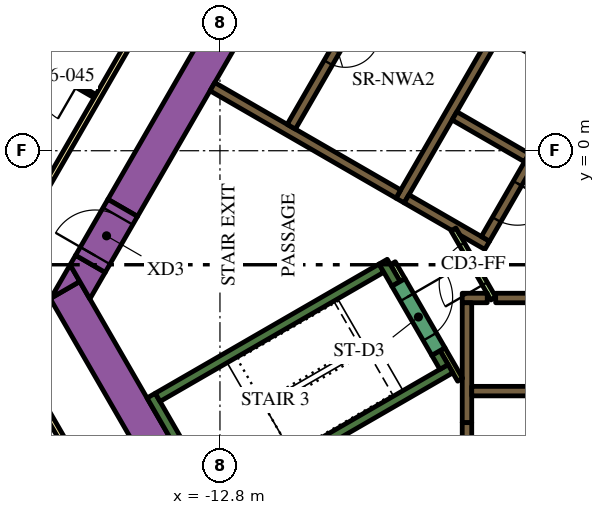
"""IFC4 building model, lengths in metres.
Left out: names, types, materials, properties, quantities, classifications, styles, units other than length and angle.
Written with IfcOpenShell. Run it as: python <this file> out.ifc"""

import sys

from ifc_helpers import new_model, si_unit, direction, frame, frame_2d, origin, place, context, subcontext, project, spatial, polyline, rectangle, outline, extrude, element, fill, save


model = new_model("IFC4")
c1 = context("Model", 3, precision=1e-05, world=origin(), true_north=direction((0.0, 1.0)))
c2 = subcontext(c1, "Body", "Model", "MODEL_VIEW")
j1 = project(units=[si_unit("LENGTHUNIT", "METRE"), si_unit("PLANEANGLEUNIT", "RADIAN")], contexts=[c1])
p1 = place(None, origin())
s1 = spatial("IfcSite", under=j1, at=p1, CompositionType="ELEMENT")
p2 = place(p1, origin())
s2 = spatial("IfcBuilding", under=s1, at=p2, CompositionType="ELEMENT")
p3 = place(p2, frame((0.0, 0.0, 91.5)))
s3 = spatial("IfcBuildingStorey", under=s2, at=p3, CompositionType="ELEMENT", Elevation=91.5)
p4 = place(p3, frame((-15.36, -1.503, 0.0), z_axis=(0.0, 0.0, 1.0), x_axis=(0.50000389221, 0.866023156604, 0.0)))
e1 = element("IfcWall", 1, at=p4, inside=s3, PredefinedType="SOLIDWALL", context=c2, shape_type="SweptSolid", body=[
    extrude(rectangle(XDim=21.0, YDim=0.9, at=frame_2d((10.5, 0.0))), origin(), (0.0, 0.0, 1.0), 3.9),
])
p5 = place(p3, frame((-12.134, -11.883, 0.0), z_axis=(0.0, 0.0, 1.0), x_axis=(-0.500005339912, 0.866022320763, 0.0)))
e2 = element("IfcWall", 2, at=p5, inside=s3, PredefinedType="SOLIDWALL", context=c2, shape_type="SweptSolid", body=[
    extrude(rectangle(XDim=9.488, YDim=0.9, at=frame_2d((4.744, 0.0))), origin(), (0.0, 0.0, 1.0), 3.9),
])
p6 = place(p3, origin())
e3 = element("IfcWall", 3, at=p6, inside=s3, PredefinedType="SOLIDWALL", context=c2, shape_type="SweptSolid", body=[
    extrude(outline(polyline([(-16.489, -3.44), (-17.251, -3.88), (-16.743, -3.0), (-16.489, -3.44)])), origin(), (0.0, 0.0, 1.0), 3.9),
])
e4 = element("IfcWall", 4, at=p6, inside=s3, PredefinedType="SOLIDWALL", context=c2, shape_type="SweptSolid", body=[
    extrude(outline(polyline([(-15.82, -3.201), (-16.223, -3.9), (-16.743, -3.0), (-16.599, -2.751), (-15.82, -3.201)])), origin(), (0.0, 0.0, 1.0), 3.9),
])
p7 = place(p3, frame((-12.885, -9.431, 0.0), z_axis=(0.0, 0.0, 1.0), x_axis=(-0.500020560727, 0.866013532718, 0.0)))
e5 = element("IfcWall", 5, at=p7, inside=s3, PredefinedType="SOLIDWALL", context=c2, shape_type="SweptSolid", body=[
    extrude(rectangle(XDim=3.45, YDim=0.25, at=frame_2d((1.725, 0.0))), origin(), (0.0, 0.0, 1.0), 3.9),
])
p8 = place(p3, frame((-14.44, -6.49, 0.0), z_axis=(0.0, 0.0, 1.0), x_axis=(0.866022966069, 0.500004222222, 0.0)))
e6 = element("IfcWall", 6, at=p8, inside=s3, PredefinedType="SOLIDWALL", context=c2, shape_type="SweptSolid", body=[
    extrude(rectangle(XDim=6.8, YDim=0.25, at=frame_2d((3.4, 0.0))), origin(), (0.0, 0.0, 1.0), 3.9),
])
p9 = place(p3, frame((-8.168, -3.503, 0.0), z_axis=(0.0, 0.0, 1.0), x_axis=(-0.499952099219, 0.866053057547, 0.0)))
e7 = element("IfcWall", 7, at=p9, inside=s3, PredefinedType="SOLIDWALL", context=c2, shape_type="SweptSolid", body=[
    extrude(rectangle(XDim=0.675, YDim=0.25, at=frame_2d((0.337, 0.0))), origin(), (0.0, 0.0, 1.0), 3.9),
])
p10 = place(p3, frame((-12.84, -9.261, 0.0), z_axis=(0.0, 0.0, 1.0), x_axis=(0.866016039709, 0.500016218704, 0.0)))
e8 = element("IfcWall", 8, at=p10, inside=s3, PredefinedType="SOLIDWALL", context=c2, shape_type="SweptSolid", body=[
    extrude(rectangle(XDim=7.05, YDim=0.25, at=frame_2d((3.525, 0.0))), origin(), (0.0, 0.0, 1.0), 3.9),
])
p11 = place(p3, frame((-6.905, -5.69, 0.0), z_axis=(0.0, 0.0, 1.0), x_axis=(-0.500402024738, 0.865793170242, 0.0)))
e9 = element("IfcWall", 9, at=p11, inside=s3, PredefinedType="SOLIDWALL", context=c2, shape_type="SweptSolid", body=[
    extrude(rectangle(XDim=0.425, YDim=0.25, at=frame_2d((0.212, 0.0))), origin(), (0.0, 0.0, 1.0), 3.9),
])
p12 = place(p3, frame((-5.545, -3.875, 0.0), z_axis=(0.0, 0.0, 1.0), x_axis=(1.0, 0.0, 0.0)))
e10 = element("IfcWall", 10, at=p12, inside=s3, PredefinedType="SOLIDWALL", context=c2, shape_type="SweptSolid", body=[
    extrude(rectangle(XDim=11.97, YDim=0.25, at=frame_2d((5.985, 0.0))), origin(), (0.0, 0.0, 1.0), 3.9),
])
p13 = place(p3, frame((-6.425, -3.875, 0.0), z_axis=(0.0, 0.0, 1.0), x_axis=(1.0, 0.0, 0.0)))
e11 = element("IfcWall", 11, at=p13, inside=s3, PredefinedType="SOLIDWALL", context=c2, shape_type="SweptSolid", body=[
    extrude(rectangle(XDim=0.658, YDim=0.25, at=frame_2d((0.329, 0.0))), origin(), (0.0, 0.0, 1.0), 3.9),
])
p14 = place(p3, frame((-6.3, -4.0, 0.0), z_axis=(0.0, 0.0, 1.0), x_axis=(0.0, -1.0, 0.0)))
e12 = element("IfcWall", 12, at=p14, inside=s3, PredefinedType="SOLIDWALL", context=c2, shape_type="SweptSolid", body=[
    extrude(rectangle(XDim=3.154, YDim=0.25, at=frame_2d((1.577, 0.0))), origin(), (0.0, 0.0, 1.0), 3.9),
])
p15 = place(p3, frame((-8.06, -1.311, 0.0), z_axis=(0.0, 0.0, 1.0), x_axis=(0.50000273126, 0.866023826885, 0.0)))
e13 = element("IfcWall", 13, at=p15, inside=s3, PredefinedType="SOLIDWALL", context=c2, shape_type="SweptSolid", body=[
    extrude(rectangle(XDim=10.33, YDim=0.25, at=frame_2d((5.165, 0.0))), origin(), (0.0, 0.0, 1.0), 3.9),
])
for number, where, z_axis, x_axis in (
    (14, (-5.369, 3.1, 0.0), (0.0, 0.0, 1.0), (0.866, -0.5, 0.0)),
    (15, (-4.724, -0.182, 0.0), (0.0, 0.0, 1.0), (-0.866, 0.5, 0.0)),
):
    element("IfcWall", number, at=place(p3, frame(where, z_axis=z_axis, x_axis=x_axis)), inside=s3, PredefinedType="SOLIDWALL", context=c2, shape_type="SweptSolid", body=[
        extrude(rectangle(XDim=2.2, YDim=0.25, at=frame_2d((1.1, 0.0))), origin(), (0.0, 0.0, 1.0), 3.9),
    ])
e16 = element("IfcWall", 16, at=p6, inside=s3, PredefinedType="SOLIDWALL", context=c2, shape_type="SweptSolid", body=[
    extrude(outline(polyline([(-5.922, -2.257), (-5.922, -2.257), (-5.705, -2.382), (-5.83, -2.598), (-6.483, -2.221), (-6.591, -2.033), (-6.591, -2.033), (-6.7, -2.096), (-7.952, -1.373), (-7.827, -1.156), (-5.922, -2.257)])), origin(), (0.0, 0.0, 1.0), 3.9),
])
p16 = place(p3, frame((-8.106, -1.14, 0.0), z_axis=(0.0, 0.0, 1.0), x_axis=(-0.866000643155, 0.500042884217, 0.0)))
e17 = element("IfcWall", 17, at=p16, inside=s3, PredefinedType="SOLIDWALL", context=c2, shape_type="SweptSolid", body=[
    extrude(rectangle(XDim=5.65, YDim=0.25, at=frame_2d((2.825, 0.0))), origin(), (0.0, 0.0, 1.0), 3.9),
])
p17 = place(p3, frame((-6.48, -6.027, 0.0), z_axis=(0.0, 0.0, 1.0), x_axis=(-0.499927229454, 0.866067413802, 0.0)))
e18 = element("IfcWall", 18, at=p17, inside=s3, PredefinedType="PARTITIONING", context=c2, shape_type="SweptSolid", body=[
    extrude(rectangle(XDim=0.929, YDim=0.15, at=frame_2d((0.464, 0.0))), origin(), (0.0, 0.0, 1.0), 3.9),
])
p18 = place(p3, frame((-8.252, -2.958, 0.0), z_axis=(0.0, 0.0, 1.0), x_axis=(0.500174715838, -0.865924508047, 0.0)))
e19 = element("IfcWall", 19, at=p18, inside=s3, PredefinedType="PARTITIONING", context=c2, shape_type="SweptSolid", body=[
    extrude(rectangle(XDim=0.514, YDim=0.15, at=frame_2d((0.257, 0.0))), origin(), (0.0, 0.0, 1.0), 2.75),
])
p19 = place(p3, frame((-6.175, -6.325, 0.0), z_axis=(0.0, 0.0, 1.0), x_axis=(1.0, 0.0, 0.0)))
e20 = element("IfcWall", 20, at=p19, inside=s3, PredefinedType="SOLIDWALL", context=c2, shape_type="SweptSolid", body=[
    extrude(rectangle(XDim=12.35, YDim=0.25, at=frame_2d((6.175, 0.0))), origin(), (0.0, 0.0, 1.0), 3.9),
])
p20 = place(p19, frame((3.205, 0.0, 0.0)))
e21 = element("IfcOpeningElement", 21, at=p20, cuts=e20, PredefinedType="OPENING", context=c2, shape_type="SweptSolid", body=[
    extrude(rectangle(XDim=0.9, YDim=2.1, at=frame_2d((0.45, 1.05))), frame((0.0, 0.135, 0.0), z_axis=(0.0, -1.0, 0.0), x_axis=(1.0, 0.0, 0.0)), (0.0, 0.0, 1.0), 0.27),
])
p21 = place(p19, frame((8.145, 0.0, 0.0)))
e22 = element("IfcOpeningElement", 22, at=p21, cuts=e20, PredefinedType="OPENING", context=c2, shape_type="SweptSolid", body=[
    extrude(rectangle(XDim=1.1, YDim=2.1, at=frame_2d((0.55, 1.05))), frame((0.0, 0.135, 0.0), z_axis=(0.0, -1.0, 0.0), x_axis=(1.0, 0.0, 0.0)), (0.0, 0.0, 1.0), 0.27),
])
p22 = place(p19, frame((10.665, 0.0, 0.0)))
e23 = element("IfcOpeningElement", 23, at=p22, cuts=e20, PredefinedType="OPENING", context=c2, shape_type="SweptSolid", body=[
    extrude(rectangle(XDim=1.1, YDim=2.1, at=frame_2d((0.55, 1.05))), frame((0.0, 0.135, 0.0), z_axis=(0.0, -1.0, 0.0), x_axis=(1.0, 0.0, 0.0)), (0.0, 0.0, 1.0), 0.27),
])
p23 = place(p3, frame((-6.008, 9.144, 0.0), z_axis=(0.0, 0.0, 1.0), x_axis=(-0.500006956611, -0.866021387346, 0.0)))
e24 = element("IfcWall", 24, at=p23, inside=s3, PredefinedType="SOLIDWALL", context=c2, shape_type="SweptSolid", body=[
    extrude(rectangle(XDim=9.83, YDim=0.25, at=frame_2d((4.915, 0.0))), origin(), (0.0, 0.0, 1.0), 3.9),
])
p24 = place(p23, frame((6.985, 0.0, 0.0)))
e25 = element("IfcOpeningElement", 25, at=p24, cuts=e24, PredefinedType="OPENING", context=c2, shape_type="SweptSolid", body=[
    extrude(rectangle(XDim=0.9, YDim=2.1, at=frame_2d((0.45, 1.05))), frame((0.0, 0.135, 0.0), z_axis=(0.0, -1.0, 0.0), x_axis=(1.0, 0.0, 0.0)), (0.0, 0.0, 1.0), 0.27),
])
p25 = place(p3, frame((-0.898, 6.194, 0.0), z_axis=(0.0, 0.0, 1.0), x_axis=(-0.499996202215, -0.866027596426, 0.0)))
e26 = element("IfcWall", 26, at=p25, inside=s3, PredefinedType="SOLIDWALL", context=c2, shape_type="SweptSolid", body=[
    extrude(rectangle(XDim=9.83, YDim=0.25, at=frame_2d((4.915, 0.0))), origin(), (0.0, 0.0, 1.0), 3.9),
])
p26 = place(p25, frame((0.585, 0.0, 0.0)))
e27 = element("IfcOpeningElement", 27, at=p26, cuts=e26, PredefinedType="OPENING", context=c2, shape_type="SweptSolid", body=[
    extrude(rectangle(XDim=1.1, YDim=2.1, at=frame_2d((0.55, 1.05))), frame((0.0, 0.135, 0.0), z_axis=(0.0, -1.0, 0.0), x_axis=(1.0, 0.0, 0.0)), (0.0, 0.0, 1.0), 0.27),
])
p27 = place(p25, frame((3.105, 0.0, 0.0)))
e28 = element("IfcOpeningElement", 28, at=p27, cuts=e26, PredefinedType="OPENING", context=c2, shape_type="SweptSolid", body=[
    extrude(rectangle(XDim=1.1, YDim=2.1, at=frame_2d((0.55, 1.05))), frame((0.0, 0.135, 0.0), z_axis=(0.0, -1.0, 0.0), x_axis=(1.0, 0.0, 0.0)), (0.0, 0.0, 1.0), 0.27),
])
p28 = place(p25, frame((5.625, 0.0, 0.0)))
e29 = element("IfcOpeningElement", 29, at=p28, cuts=e26, PredefinedType="OPENING", context=c2, shape_type="SweptSolid", body=[
    extrude(rectangle(XDim=1.1, YDim=2.1, at=frame_2d((0.55, 1.05))), frame((0.0, 0.135, 0.0), z_axis=(0.0, -1.0, 0.0), x_axis=(1.0, 0.0, 0.0)), (0.0, 0.0, 1.0), 0.27),
])
p29 = place(p25, frame((8.145, 0.0, 0.0)))
e30 = element("IfcOpeningElement", 30, at=p29, cuts=e26, PredefinedType="OPENING", context=c2, shape_type="SweptSolid", body=[
    extrude(rectangle(XDim=1.1, YDim=2.1, at=frame_2d((0.55, 1.05))), frame((0.0, 0.135, 0.0), z_axis=(0.0, -1.0, 0.0), x_axis=(1.0, 0.0, 0.0)), (0.0, 0.0, 1.0), 0.27),
])
p30 = place(p3, frame((-8.103, -3.466, 0.0), z_axis=(0.0, 0.0, 1.0), x_axis=(0.500078061341, -0.865980330357, 0.0)))
e31 = element("IfcWall", 31, at=p30, inside=s3, PredefinedType="SOLIDWALL", context=c2, shape_type="SweptSolid", body=[
    extrude(rectangle(XDim=2.1, YDim=0.4, at=frame_2d((1.05, 0.0))), origin(), (0.0, 0.0, 1.0), 3.9),
])
p31 = place(p30, frame((0.45, 0.0, 0.0)))
e32 = element("IfcOpeningElement", 32, at=p31, cuts=e31, PredefinedType="OPENING", context=c2, shape_type="SweptSolid", body=[
    extrude(rectangle(XDim=1.2, YDim=2.1, at=frame_2d((0.6, 1.05))), frame((0.0, 0.21, 0.0), z_axis=(0.0, -1.0, 0.0), x_axis=(1.0, 0.0, 0.0)), (0.0, 0.0, 1.0), 0.42),
])
p32 = place(p3, frame((-6.3, -7.154, 0.0), z_axis=(0.0, 0.0, 1.0), x_axis=(0.0, -1.0, 0.0)))
e33 = element("IfcWall", 33, at=p32, inside=s3, PredefinedType="SOLIDWALL", context=c2, shape_type="SweptSolid", body=[
    extrude(rectangle(XDim=1.8, YDim=0.25, at=frame_2d((0.9, 0.0))), origin(), (0.0, 0.0, 1.0), 3.9),
])
p33 = place(p32, frame((0.45, 0.0, 0.0)))
e34 = element("IfcOpeningElement", 34, at=p33, cuts=e33, PredefinedType="OPENING", context=c2, shape_type="SweptSolid", body=[
    extrude(rectangle(XDim=0.9, YDim=2.1, at=frame_2d((0.45, 1.05))), frame((0.0, 0.135, 0.0), z_axis=(0.0, -1.0, 0.0), x_axis=(1.0, 0.0, 0.0)), (0.0, 0.0, 1.0), 0.27),
])
p34 = place(p3, frame((-5.606, -3.89, 0.0), z_axis=(0.0, 0.0, 1.0), x_axis=(-0.500027713859, 0.866009402589, 0.0)))
e35 = element("IfcWall", 35, at=p34, inside=s3, PredefinedType="PARTITIONING", context=c2, shape_type="SweptSolid", body=[
    extrude(rectangle(XDim=2.1, YDim=0.15, at=frame_2d((1.05, 0.0))), origin(), (0.0, 0.0, 1.0), 2.75),
])
p35 = place(p34, frame((0.45, 0.0, 0.0)))
e36 = element("IfcOpeningElement", 36, at=p35, cuts=e35, PredefinedType="OPENING", context=c2, shape_type="SweptSolid", body=[
    extrude(rectangle(XDim=1.2, YDim=2.1, at=frame_2d((0.6, 1.05))), frame((0.0, 0.085, 0.0), z_axis=(0.0, -1.0, 0.0), x_axis=(1.0, 0.0, 0.0)), (0.0, 0.0, 1.0), 0.17),
])
p36 = place(p3, frame((-16.209, -2.976, 0.0), z_axis=(0.0, 0.0, 1.0), x_axis=(0.499954529098, 0.86605165483, 0.0)))
e37 = element("IfcWall", 37, at=p36, inside=s3, PredefinedType="SOLIDWALL", context=c2, shape_type="SweptSolid", body=[
    extrude(rectangle(XDim=1.7, YDim=0.9, at=frame_2d((0.85, 0.0))), origin(), (0.0, 0.0, 1.0), 3.9),
])
p37 = place(p36, frame((0.25, 0.0, 0.0)))
e38 = element("IfcOpeningElement", 38, at=p37, cuts=e37, PredefinedType="OPENING", context=c2, shape_type="SweptSolid", body=[
    extrude(rectangle(XDim=1.2, YDim=2.1, at=frame_2d((0.6, 1.05))), frame((0.0, 0.46, 0.0), z_axis=(0.0, -1.0, 0.0), x_axis=(1.0, 0.0, 0.0)), (0.0, 0.0, 1.0), 0.92),
])
p38 = place(p3, frame((-19.081, -3.9, 0.0), z_axis=(0.0, 0.0, 1.0), x_axis=(0.499998313975, 0.866026377209, 0.0)))
e39 = element("IfcWall", 39, at=p38, inside=s3, PredefinedType="PARTITIONING", context=c2, shape_type="SweptSolid", body=[
    extrude(rectangle(XDim=25.766, YDim=0.15, at=frame_2d((12.883, 0.0))), origin(), (0.0, 0.0, 1.0), 2.75),
])
p39 = place(p38, frame((19.306, 0.0, 0.0)))
e40 = element("IfcOpeningElement", 40, at=p39, cuts=e39, PredefinedType="OPENING", context=c2, shape_type="SweptSolid", body=[
    extrude(rectangle(XDim=1.0, YDim=2.1, at=frame_2d((0.5, 1.05))), frame((0.0, 0.085, 0.0), z_axis=(0.0, -1.0, 0.0), x_axis=(1.0, 0.0, 0.0)), (0.0, 0.0, 1.0), 0.17),
])
p40 = place(p38, frame((18.0, 0.0, 0.0)))
e41 = element("IfcOpeningElement", 41, at=p40, cuts=e39, PredefinedType="OPENING", context=c2, shape_type="SweptSolid", body=[
    extrude(rectangle(XDim=1.0, YDim=2.1, at=frame_2d((0.5, 1.05))), frame((0.0, 0.085, 0.0), z_axis=(0.0, -1.0, 0.0), x_axis=(1.0, 0.0, 0.0)), (0.0, 0.0, 1.0), 0.17),
])
p41 = place(p38, frame((10.874, 0.0, 0.0)))
e42 = element("IfcOpeningElement", 42, at=p41, cuts=e39, PredefinedType="OPENING", context=c2, shape_type="SweptSolid", body=[
    extrude(rectangle(XDim=0.9, YDim=2.1, at=frame_2d((0.45, 1.05))), frame((0.0, 0.085, 0.0), z_axis=(0.0, -1.0, 0.0), x_axis=(1.0, 0.0, 0.0)), (0.0, 0.0, 1.0), 0.17),
])
p42 = place(p38, frame((8.548, 0.0, 0.0)))
e43 = element("IfcOpeningElement", 43, at=p42, cuts=e39, PredefinedType="OPENING", context=c2, shape_type="SweptSolid", body=[
    extrude(rectangle(XDim=1.1, YDim=2.1, at=frame_2d((0.55, 1.05))), frame((0.0, 0.085, 0.0), z_axis=(0.0, -1.0, 0.0), x_axis=(1.0, 0.0, 0.0)), (0.0, 0.0, 1.0), 0.17),
])
p43 = place(p38, frame((0.18, 0.0, 0.0)))
e44 = element("IfcOpeningElement", 44, at=p43, cuts=e39, PredefinedType="OPENING", context=c2, shape_type="SweptSolid", body=[
    extrude(rectangle(XDim=1.0, YDim=2.1, at=frame_2d((0.5, 1.05))), frame((0.0, 0.085, 0.0), z_axis=(0.0, -1.0, 0.0), x_axis=(1.0, 0.0, 0.0)), (0.0, 0.0, 1.0), 0.17),
])
p44 = place(p3, frame((-16.412, -8.523, 0.0), z_axis=(0.0, 0.0, 1.0), x_axis=(-0.500001929737, 0.866024289647, 0.0)))
e45 = element("IfcWall", 45, at=p44, inside=s3, PredefinedType="PARTITIONING", context=c2, shape_type="SweptSolid", body=[
    extrude(rectangle(XDim=5.268, YDim=0.15, at=frame_2d((2.634, 0.0))), origin(), (0.0, 0.0, 1.0), 2.75),
])
p45 = place(p3, frame((-26.591, -3.122, 0.0), z_axis=(0.0, 0.0, 1.0), x_axis=(0.893766213273, -0.448533115847, 0.0)))
e46 = element("IfcWall", 46, at=p45, inside=s3, PredefinedType="PARTITIONING", context=c2, shape_type="SweptSolid", body=[
    extrude(rectangle(XDim=10.875, YDim=0.15, at=frame_2d((5.438, 0.0))), origin(), (0.0, 0.0, 1.0), 2.75),
])
p46 = place(p3, frame((-16.087, 1.436, 0.0), z_axis=(0.0, 0.0, 1.0), x_axis=(-0.866034573852, 0.49998411664, 0.0)))
e47 = element("IfcWall", 47, at=p46, inside=s3, PredefinedType="PARTITIONING", context=c2, shape_type="SweptSolid", body=[
    extrude(rectangle(XDim=2.8, YDim=0.1, at=frame_2d((1.4, 0.0))), origin(), (0.0, 0.0, 1.0), 2.75),
])
p47 = place(p46, frame((0.55, 0.0, 0.0)))
e48 = element("IfcOpeningElement", 48, at=p47, cuts=e47, PredefinedType="OPENING", context=c2, shape_type="SweptSolid", body=[
    extrude(rectangle(XDim=1.0, YDim=2.1, at=frame_2d((0.5, 1.05))), frame((0.0, 0.06, 0.0), z_axis=(0.0, -1.0, 0.0), x_axis=(1.0, 0.0, 0.0)), (0.0, 0.0, 1.0), 0.12),
])
p48 = place(p24, origin())
e49 = element("IfcDoor", 49, at=p48, inside=s3, OperationType="SINGLE_SWING_LEFT", PredefinedType="DOOR", context=c2, shape_type="SweptSolid", body=[
    extrude(rectangle(XDim=0.9, YDim=2.1, at=frame_2d((0.45, 1.05))), frame((0.0, 0.025, 0.0), z_axis=(0.0, -1.0, 0.0), x_axis=(1.0, 0.0, 0.0)), (0.0, 0.0, 1.0), 0.05),
])
fill(e25, e49)
p49 = place(p29, origin())
e50 = element("IfcDoor", 50, at=p49, inside=s3, OperationType="DOUBLE_DOOR_SLIDING", PredefinedType="DOOR", context=c2, shape_type="SweptSolid", body=[
    extrude(rectangle(XDim=1.1, YDim=2.1, at=frame_2d((0.55, 1.05))), frame((0.0, 0.025, 0.0), z_axis=(0.0, -1.0, 0.0), x_axis=(1.0, 0.0, 0.0)), (0.0, 0.0, 1.0), 0.05),
])
fill(e30, e50)
p50 = place(p31, origin())
e51 = element("IfcDoor", 51, at=p50, inside=s3, OperationType="SINGLE_SWING_LEFT", PredefinedType="DOOR", context=c2, shape_type="SweptSolid", body=[
    extrude(rectangle(XDim=1.2, YDim=2.1, at=frame_2d((0.6, 1.05))), frame((0.0, 0.025, 0.0), z_axis=(0.0, -1.0, 0.0), x_axis=(1.0, 0.0, 0.0)), (0.0, 0.0, 1.0), 0.05),
])
fill(e32, e51)
p51 = place(p35, origin())
e52 = element("IfcDoor", 52, at=p51, inside=s3, OperationType="SINGLE_SWING_LEFT", PredefinedType="DOOR", context=c2, shape_type="SweptSolid", body=[
    extrude(rectangle(XDim=1.2, YDim=2.1, at=frame_2d((0.6, 1.05))), frame((0.0, 0.025, 0.0), z_axis=(0.0, -1.0, 0.0), x_axis=(1.0, 0.0, 0.0)), (0.0, 0.0, 1.0), 0.05),
])
fill(e36, e52)
p52 = place(p37, origin())
e53 = element("IfcDoor", 53, at=p52, inside=s3, OperationType="SINGLE_SWING_LEFT", PredefinedType="DOOR", context=c2, shape_type="SweptSolid", body=[
    extrude(rectangle(XDim=1.2, YDim=2.1, at=frame_2d((0.6, 1.05))), frame((0.0, 0.025, 0.0), z_axis=(0.0, -1.0, 0.0), x_axis=(1.0, 0.0, 0.0)), (0.0, 0.0, 1.0), 0.05),
])
fill(e38, e53)
p53 = place(p47, origin())
e54 = element("IfcDoor", 54, at=p53, inside=s3, OperationType="SINGLE_SWING_RIGHT", PredefinedType="DOOR", context=c2, shape_type="SweptSolid", body=[
    extrude(rectangle(XDim=1.0, YDim=2.1, at=frame_2d((0.5, 1.05))), frame((0.0, 0.025, 0.0), z_axis=(0.0, -1.0, 0.0), x_axis=(1.0, 0.0, 0.0)), (0.0, 0.0, 1.0), 0.05),
])
fill(e48, e54)
save(model, sys.argv[1])
